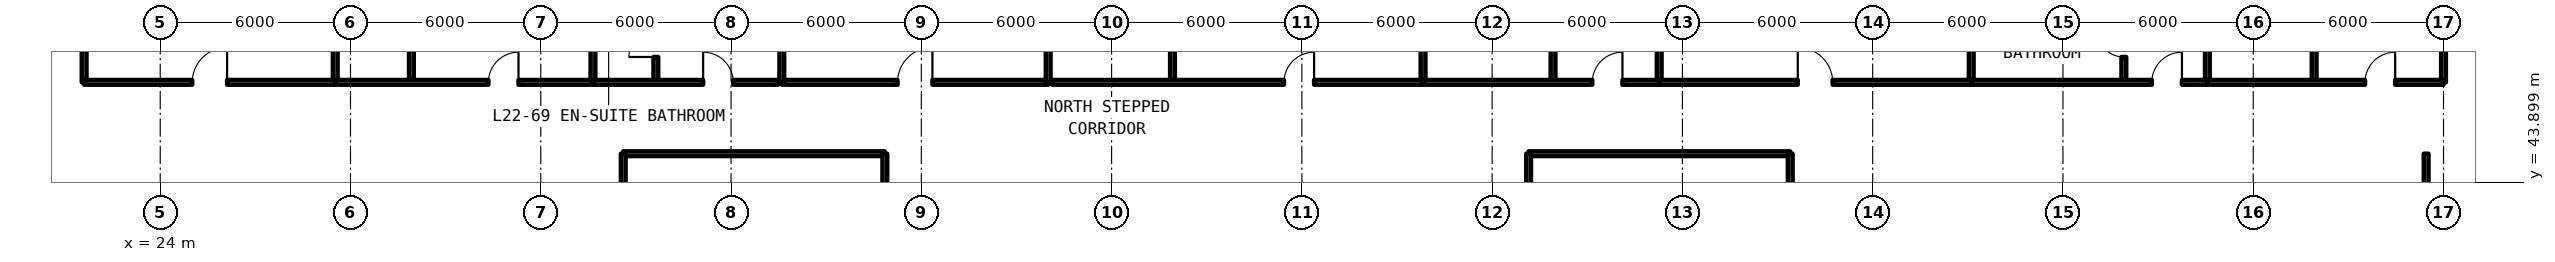
"""IFC4 building model, lengths in metres.
Left out: names, types, materials, properties, quantities, classifications, styles, units other than length and angle.
Written with IfcOpenShell. Run it as: python <this file> out.ifc"""

import sys

from ifc_helpers import new_model, si_unit, direction, frame, frame_2d, origin, place, context, subcontext, project, spatial, rectangle, extrude, element, fill, save


model = new_model("IFC4")
c1 = context("Model", 3, precision=1e-05, world=origin(), true_north=direction((0.0, 1.0)))
c2 = subcontext(c1, "Body", "Model", "MODEL_VIEW")
j1 = project(units=[si_unit("LENGTHUNIT", "METRE"), si_unit("PLANEANGLEUNIT", "RADIAN")], contexts=[c1])
p1 = place(None, origin())
s1 = spatial("IfcSite", under=j1, at=p1, CompositionType="ELEMENT")
p2 = place(p1, origin())
s2 = spatial("IfcBuilding", under=s1, at=p2, CompositionType="ELEMENT")
p3 = place(p2, frame((0.0, 0.0, 82.17)))
s3 = spatial("IfcBuildingStorey", under=s2, at=p3, CompositionType="ELEMENT", Elevation=82.17)
p4 = place(p3, frame((38.6, 44.8, 0.0), z_axis=(0.0, 0.0, 1.0), x_axis=(1.0, 0.0, 0.0)))
e1 = element("IfcWall", 1, at=p4, inside=s3, PredefinedType="SOLIDWALL", context=c2, shape_type="SweptSolid", body=[
    extrude(rectangle(XDim=8.25, YDim=0.15, at=frame_2d((4.125, 0.0))), origin(), (0.0, 0.0, 1.0), 2.35),
])
p5 = place(p3, frame((38.6, 22.4, 0.0), z_axis=(0.0, 0.0, 1.0), x_axis=(0.0, 1.0, 0.0)))
e2 = element("IfcWall", 2, at=p5, inside=s3, PredefinedType="SOLIDWALL", context=c2, shape_type="SweptSolid", body=[
    extrude(rectangle(XDim=22.4, YDim=0.15, at=frame_2d((11.2, 0.0))), origin(), (0.0, 0.0, 1.0), 2.35),
])
p6 = place(p5, frame((8.025, 0.0, 0.0)))
e3 = element("IfcOpeningElement", 3, at=p6, cuts=e2, PredefinedType="OPENING", context=c2, shape_type="SweptSolid", body=[
    extrude(rectangle(XDim=0.95, YDim=2.15, at=frame_2d((0.475, 1.075))), frame((0.0, 0.085, 0.0), z_axis=(0.0, -1.0, 0.0), x_axis=(1.0, 0.0, 0.0)), (0.0, 0.0, 1.0), 0.17),
])
p7 = place(p3, frame((46.85, 22.4, 0.0), z_axis=(0.0, 0.0, 1.0), x_axis=(0.0, 1.0, 0.0)))
e4 = element("IfcWall", 4, at=p7, inside=s3, PredefinedType="SOLIDWALL", context=c2, shape_type="SweptSolid", body=[
    extrude(rectangle(XDim=22.4, YDim=0.15, at=frame_2d((11.2, 0.0))), origin(), (0.0, 0.0, 1.0), 2.35),
])
p8 = place(p3, frame((67.15, 44.8, 0.0), z_axis=(0.0, 0.0, 1.0), x_axis=(1.0, 0.0, 0.0)))
e5 = element("IfcWall", 5, at=p8, inside=s3, PredefinedType="SOLIDWALL", context=c2, shape_type="SweptSolid", body=[
    extrude(rectangle(XDim=8.25, YDim=0.15, at=frame_2d((4.125, 0.0))), origin(), (0.0, 0.0, 1.0), 2.35),
])
p9 = place(p3, frame((67.15, 22.4, 0.0), z_axis=(0.0, 0.0, 1.0), x_axis=(0.0, 1.0, 0.0)))
e6 = element("IfcWall", 6, at=p9, inside=s3, PredefinedType="SOLIDWALL", context=c2, shape_type="SweptSolid", body=[
    extrude(rectangle(XDim=22.4, YDim=0.15, at=frame_2d((11.2, 0.0))), origin(), (0.0, 0.0, 1.0), 2.35),
])
p10 = place(p3, frame((75.4, 22.4, 0.0), z_axis=(0.0, 0.0, 1.0), x_axis=(0.0, 1.0, 0.0)))
e7 = element("IfcWall", 7, at=p10, inside=s3, PredefinedType="SOLIDWALL", context=c2, shape_type="SweptSolid", body=[
    extrude(rectangle(XDim=22.4, YDim=0.15, at=frame_2d((11.2, 0.0))), origin(), (0.0, 0.0, 1.0), 2.35),
])
p11 = place(p10, frame((8.025, 0.0, 0.0)))
e8 = element("IfcOpeningElement", 8, at=p11, cuts=e7, PredefinedType="OPENING", context=c2, shape_type="SweptSolid", body=[
    extrude(rectangle(XDim=0.95, YDim=2.15, at=frame_2d((0.475, 1.075))), frame((0.0, 0.085, 0.0), z_axis=(0.0, -1.0, 0.0), x_axis=(1.0, 0.0, 0.0)), (0.0, 0.0, 1.0), 0.17),
])
p12 = place(p3, frame((95.452, 39.6, 0.0), z_axis=(0.0, 0.0, 1.0), x_axis=(0.0, 1.0, 0.0)))
e9 = element("IfcWall", 9, at=p12, inside=s3, PredefinedType="PARTITIONING", context=c2, shape_type="SweptSolid", body=[
    extrude(rectangle(XDim=5.2, YDim=0.15, at=frame_2d((2.6, 0.0))), origin(), (0.0, 0.0, 1.0), 2.35),
])
p13 = place(p3, frame((43.6, 47.05, 0.0), z_axis=(0.0, 0.0, 1.0), x_axis=(1.0, 0.0, 0.0)))
e10 = element("IfcWall", 10, at=p13, inside=s3, PredefinedType="SOLIDWALL", context=c2, shape_type="SweptSolid", body=[
    extrude(rectangle(XDim=8.4, YDim=0.15, at=frame_2d((4.2, 0.0))), origin(), (0.0, 0.0, 1.0), 2.35),
])
p14 = place(p13, frame((3.65, 0.0, 0.0)))
e11 = element("IfcOpeningElement", 11, at=p14, cuts=e10, PredefinedType="OPENING", context=c2, shape_type="SweptSolid", body=[
    extrude(rectangle(XDim=1.1, YDim=2.15, at=frame_2d((0.55, 1.075))), frame((0.0, 0.085, 0.0), z_axis=(0.0, -1.0, 0.0), x_axis=(1.0, 0.0, 0.0)), (0.0, 0.0, 1.0), 0.17),
])
for number, where, z_axis, x_axis in (
    (12, (43.6, 47.05, 0.0), (0.0, 0.0, 1.0), (0.0, 1.0, 0.0)),
    (13, (52.0, 47.05, 0.0), (0.0, 0.0, 1.0), (0.0, 1.0, 0.0)),
    (14, (21.6, 47.05, 0.0), (0.0, 0.0, 1.0), (0.0, 1.0, 0.0)),
    (15, (29.519, 47.05, 0.0), (0.0, 0.0, 1.0), (0.0, 1.0, 0.0)),
):
    element("IfcWall", number, at=place(p3, frame(where, z_axis=z_axis, x_axis=x_axis)), inside=s3, PredefinedType="SOLIDWALL", context=c2, shape_type="SweptSolid", body=[
        extrude(rectangle(XDim=10.3, YDim=0.15, at=frame_2d((5.15, 0.0))), origin(), (0.0, 0.0, 1.0), 2.35),
    ])
p15 = place(p3, frame((21.6, 47.05, 0.0), z_axis=(0.0, 0.0, 1.0), x_axis=(1.0, 0.0, 0.0)))
e16 = element("IfcWall", 16, at=p15, inside=s3, PredefinedType="SOLIDWALL", context=c2, shape_type="SweptSolid", body=[
    extrude(rectangle(XDim=7.918, YDim=0.15, at=frame_2d((3.959, 0.0))), origin(), (0.0, 0.0, 1.0), 2.35),
])
p16 = place(p15, frame((3.409, 0.0, 0.0)))
e17 = element("IfcOpeningElement", 17, at=p16, cuts=e16, PredefinedType="OPENING", context=c2, shape_type="SweptSolid", body=[
    extrude(rectangle(XDim=1.1, YDim=2.15, at=frame_2d((0.55, 1.075))), frame((0.0, 0.085, 0.0), z_axis=(0.0, -1.0, 0.0), x_axis=(1.0, 0.0, 0.0)), (0.0, 0.0, 1.0), 0.17),
])
p17 = place(p3, frame((37.646, 47.05, 0.0), z_axis=(0.0, 0.0, 1.0), x_axis=(0.0, 1.0, 0.0)))
e18 = element("IfcWall", 18, at=p17, inside=s3, PredefinedType="SOLIDWALL", context=c2, shape_type="SweptSolid", body=[
    extrude(rectangle(XDim=10.3, YDim=0.15, at=frame_2d((5.15, 0.0))), origin(), (0.0, 0.0, 1.0), 2.35),
])
p18 = place(p3, frame((31.92, 47.05, 0.0), z_axis=(0.0, 0.0, 1.0), x_axis=(0.0, 1.0, 0.0)))
e19 = element("IfcWall", 19, at=p18, inside=s3, PredefinedType="PARTITIONING", context=c2, shape_type="SweptSolid", body=[
    extrude(rectangle(XDim=6.67, YDim=0.15, at=frame_2d((3.335, 0.0))), origin(), (0.0, 0.0, 1.0), 2.35),
])
p19 = place(p18, frame((1.543, 0.0, 0.0)))
e20 = element("IfcOpeningElement", 20, at=p19, cuts=e19, PredefinedType="OPENING", context=c2, shape_type="SweptSolid", body=[
    extrude(rectangle(XDim=0.85, YDim=2.1, at=frame_2d((0.425, 1.05))), frame((0.0, 0.085, 0.0), z_axis=(0.0, -1.0, 0.0), x_axis=(1.0, 0.0, 0.0)), (0.0, 0.0, 1.0), 0.17),
])
p20 = place(p18, frame((4.878, 0.0, 0.0)))
e21 = element("IfcOpeningElement", 21, at=p20, cuts=e19, PredefinedType="OPENING", context=c2, shape_type="SweptSolid", body=[
    extrude(rectangle(XDim=0.85, YDim=2.1, at=frame_2d((0.425, 1.05))), frame((0.0, 0.085, 0.0), z_axis=(0.0, -1.0, 0.0), x_axis=(1.0, 0.0, 0.0)), (0.0, 0.0, 1.0), 0.17),
])
p21 = place(p3, frame((29.519, 47.05, 0.0), z_axis=(0.0, 0.0, 1.0), x_axis=(1.0, 0.0, 0.0)))
e22 = element("IfcWall", 22, at=p21, inside=s3, PredefinedType="SOLIDWALL", context=c2, shape_type="SweptSolid", body=[
    extrude(rectangle(XDim=8.127, YDim=0.15, at=frame_2d((4.063, 0.0))), origin(), (0.0, 0.0, 1.0), 2.35),
])
p22 = place(p21, frame((4.829, 0.0, 0.0)))
e23 = element("IfcOpeningElement", 23, at=p22, cuts=e22, PredefinedType="OPENING", context=c2, shape_type="SweptSolid", body=[
    extrude(rectangle(XDim=0.95, YDim=2.15, at=frame_2d((0.475, 1.075))), frame((0.0, 0.085, 0.0), z_axis=(0.0, -1.0, 0.0), x_axis=(1.0, 0.0, 0.0)), (0.0, 0.0, 1.0), 0.17),
])
p23 = place(p3, frame((39.629, 47.05, 0.0), z_axis=(0.0, 0.0, 1.0), x_axis=(0.0, 1.0, 0.0)))
e24 = element("IfcWall", 24, at=p23, inside=s3, PredefinedType="PARTITIONING", context=c2, shape_type="SweptSolid", body=[
    extrude(rectangle(XDim=10.3, YDim=0.15, at=frame_2d((5.15, 0.0))), origin(), (0.0, 0.0, 1.0), 2.35),
])
p24 = place(p23, frame((0.8, 0.0, 0.0)))
e25 = element("IfcOpeningElement", 25, at=p24, cuts=e24, PredefinedType="OPENING", context=c2, shape_type="SweptSolid", body=[
    extrude(rectangle(XDim=0.85, YDim=2.1, at=frame_2d((0.425, 1.05))), frame((0.0, 0.085, 0.0), z_axis=(0.0, -1.0, 0.0), x_axis=(1.0, 0.0, 0.0)), (0.0, 0.0, 1.0), 0.17),
])
p25 = place(p23, frame((5.25, 0.0, 0.0)))
e26 = element("IfcOpeningElement", 26, at=p25, cuts=e24, PredefinedType="OPENING", context=c2, shape_type="SweptSolid", body=[
    extrude(rectangle(XDim=0.85, YDim=2.1, at=frame_2d((0.425, 1.05))), frame((0.0, 0.085, 0.0), z_axis=(0.0, -1.0, 0.0), x_axis=(1.0, 0.0, 0.0)), (0.0, 0.0, 1.0), 0.17),
])
p26 = place(p3, frame((37.646, 47.05, 0.0), z_axis=(0.0, 0.0, 1.0), x_axis=(1.0, 0.0, 0.0)))
e27 = element("IfcWall", 27, at=p26, inside=s3, PredefinedType="SOLIDWALL", context=c2, shape_type="SweptSolid", body=[
    extrude(rectangle(XDim=5.834, YDim=0.15, at=frame_2d((2.917, 0.0))), origin(), (0.0, 0.0, 1.0), 2.35),
])
p27 = place(p26, frame((3.474, 0.0, 0.0)))
e28 = element("IfcOpeningElement", 28, at=p27, cuts=e27, PredefinedType="OPENING", context=c2, shape_type="SweptSolid", body=[
    extrude(rectangle(XDim=0.95, YDim=2.15, at=frame_2d((0.475, 1.075))), frame((0.0, 0.085, 0.0), z_axis=(0.0, -1.0, 0.0), x_axis=(1.0, 0.0, 0.0)), (0.0, 0.0, 1.0), 0.17),
])
for number, where, z_axis, x_axis in (
    (29, (96.0, 47.05, 0.0), (0.0, 0.0, 1.0), (0.0, 1.0, 0.0)),
    (30, (63.821, 47.05, 0.0), (0.0, 0.0, 1.0), (0.0, 1.0, 0.0)),
):
    element("IfcWall", number, at=place(p3, frame(where, z_axis=z_axis, x_axis=x_axis)), inside=s3, PredefinedType="SOLIDWALL", context=c2, shape_type="SweptSolid", body=[
        extrude(rectangle(XDim=10.3, YDim=0.15, at=frame_2d((5.15, 0.0))), origin(), (0.0, 0.0, 1.0), 2.35),
    ])
p28 = place(p3, frame((55.92, 47.05, 0.0), z_axis=(0.0, 0.0, 1.0), x_axis=(0.0, 1.0, 0.0)))
e31 = element("IfcWall", 31, at=p28, inside=s3, PredefinedType="PARTITIONING", context=c2, shape_type="SweptSolid", body=[
    extrude(rectangle(XDim=5.452, YDim=0.15, at=frame_2d((2.726, 0.0))), origin(), (0.0, 0.0, 1.0), 2.35),
])
p29 = place(p28, frame((1.183, 0.0, 0.0)))
e32 = element("IfcOpeningElement", 32, at=p29, cuts=e31, PredefinedType="OPENING", context=c2, shape_type="SweptSolid", body=[
    extrude(rectangle(XDim=0.85, YDim=2.1, at=frame_2d((0.425, 1.05))), frame((0.0, 0.085, 0.0), z_axis=(0.0, -1.0, 0.0), x_axis=(1.0, 0.0, 0.0)), (0.0, 0.0, 1.0), 0.17),
])
p30 = place(p28, frame((3.909, 0.0, 0.0)))
e33 = element("IfcOpeningElement", 33, at=p30, cuts=e31, PredefinedType="OPENING", context=c2, shape_type="SweptSolid", body=[
    extrude(rectangle(XDim=0.85, YDim=2.1, at=frame_2d((0.425, 1.05))), frame((0.0, 0.085, 0.0), z_axis=(0.0, -1.0, 0.0), x_axis=(1.0, 0.0, 0.0)), (0.0, 0.0, 1.0), 0.17),
])
p31 = place(p3, frame((52.12, 47.05, 0.0), z_axis=(0.0, 0.0, 1.0), x_axis=(1.0, 0.0, 0.0)))
e34 = element("IfcWall", 34, at=p31, inside=s3, PredefinedType="SOLIDWALL", context=c2, shape_type="SweptSolid", body=[
    extrude(rectangle(XDim=11.701, YDim=0.15, at=frame_2d((5.851, 0.0))), origin(), (0.0, 0.0, 1.0), 2.35),
])
p32 = place(p31, frame((7.316, 0.0, 0.0)))
e35 = element("IfcOpeningElement", 35, at=p32, cuts=e34, PredefinedType="OPENING", context=c2, shape_type="SweptSolid", body=[
    extrude(rectangle(XDim=0.95, YDim=2.15, at=frame_2d((0.475, 1.075))), frame((0.0, 0.085, 0.0), z_axis=(0.0, -1.0, 0.0), x_axis=(1.0, 0.0, 0.0)), (0.0, 0.0, 1.0), 0.17),
])
p33 = place(p3, frame((71.268, 47.05, 0.0), z_axis=(0.0, 0.0, 1.0), x_axis=(0.0, 1.0, 0.0)))
e36 = element("IfcWall", 36, at=p33, inside=s3, PredefinedType="SOLIDWALL", context=c2, shape_type="SweptSolid", body=[
    extrude(rectangle(XDim=10.3, YDim=0.15, at=frame_2d((5.15, 0.0))), origin(), (0.0, 0.0, 1.0), 2.35),
])
p34 = place(p3, frame((67.92, 47.05, 0.0), z_axis=(0.0, 0.0, 1.0), x_axis=(0.0, 1.0, 0.0)))
e37 = element("IfcWall", 37, at=p34, inside=s3, PredefinedType="PARTITIONING", context=c2, shape_type="SweptSolid", body=[
    extrude(rectangle(XDim=6.338, YDim=0.15, at=frame_2d((3.169, 0.0))), origin(), (0.0, 0.0, 1.0), 2.35),
])
p35 = place(p34, frame((1.445, 0.0, 0.0)))
e38 = element("IfcOpeningElement", 38, at=p35, cuts=e37, PredefinedType="OPENING", context=c2, shape_type="SweptSolid", body=[
    extrude(rectangle(XDim=0.85, YDim=2.1, at=frame_2d((0.425, 1.05))), frame((0.0, 0.085, 0.0), z_axis=(0.0, -1.0, 0.0), x_axis=(1.0, 0.0, 0.0)), (0.0, 0.0, 1.0), 0.17),
])
p36 = place(p34, frame((4.614, 0.0, 0.0)))
e39 = element("IfcOpeningElement", 39, at=p36, cuts=e37, PredefinedType="OPENING", context=c2, shape_type="SweptSolid", body=[
    extrude(rectangle(XDim=0.85, YDim=2.1, at=frame_2d((0.425, 1.05))), frame((0.0, 0.085, 0.0), z_axis=(0.0, -1.0, 0.0), x_axis=(1.0, 0.0, 0.0)), (0.0, 0.0, 1.0), 0.17),
])
p37 = place(p3, frame((63.821, 47.05, 0.0), z_axis=(0.0, 0.0, 1.0), x_axis=(1.0, 0.0, 0.0)))
e40 = element("IfcWall", 40, at=p37, inside=s3, PredefinedType="SOLIDWALL", context=c2, shape_type="SweptSolid", body=[
    extrude(rectangle(XDim=7.446, YDim=0.15, at=frame_2d((3.723, 0.0))), origin(), (0.0, 0.0, 1.0), 2.35),
])
p38 = place(p37, frame((5.337, 0.0, 0.0)))
e41 = element("IfcOpeningElement", 41, at=p38, cuts=e40, PredefinedType="OPENING", context=c2, shape_type="SweptSolid", body=[
    extrude(rectangle(XDim=0.95, YDim=2.15, at=frame_2d((0.475, 1.075))), frame((0.0, 0.085, 0.0), z_axis=(0.0, -1.0, 0.0), x_axis=(1.0, 0.0, 0.0)), (0.0, 0.0, 1.0), 0.17),
])
p39 = place(p3, frame((81.107, 47.05, 0.0), z_axis=(0.0, 0.0, 1.0), x_axis=(0.0, 1.0, 0.0)))
e42 = element("IfcWall", 42, at=p39, inside=s3, PredefinedType="SOLIDWALL", context=c2, shape_type="SweptSolid", body=[
    extrude(rectangle(XDim=10.3, YDim=0.15, at=frame_2d((5.15, 0.0))), origin(), (0.0, 0.0, 1.0), 2.35),
])
p40 = place(p3, frame((71.268, 47.05, 0.0), z_axis=(0.0, 0.0, 1.0), x_axis=(1.0, 0.0, 0.0)))
e43 = element("IfcWall", 43, at=p40, inside=s3, PredefinedType="SOLIDWALL", context=c2, shape_type="SweptSolid", body=[
    extrude(rectangle(XDim=9.84, YDim=0.15, at=frame_2d((4.92, 0.0))), origin(), (0.0, 0.0, 1.0), 2.35),
])
p41 = place(p40, frame((4.37, 0.0, 0.0)))
e44 = element("IfcOpeningElement", 44, at=p41, cuts=e43, PredefinedType="OPENING", context=c2, shape_type="SweptSolid", body=[
    extrude(rectangle(XDim=1.1, YDim=2.15, at=frame_2d((0.55, 1.075))), frame((0.0, 0.085, 0.0), z_axis=(0.0, -1.0, 0.0), x_axis=(1.0, 0.0, 0.0)), (0.0, 0.0, 1.0), 0.17),
])
p42 = place(p3, frame((88.554, 47.05, 0.0), z_axis=(0.0, 0.0, 1.0), x_axis=(0.0, 1.0, 0.0)))
e45 = element("IfcWall", 45, at=p42, inside=s3, PredefinedType="SOLIDWALL", context=c2, shape_type="SweptSolid", body=[
    extrude(rectangle(XDim=10.3, YDim=0.15, at=frame_2d((5.15, 0.0))), origin(), (0.0, 0.0, 1.0), 2.35),
])
p43 = place(p3, frame((85.92, 47.05, 0.0), z_axis=(0.0, 0.0, 1.0), x_axis=(0.0, 1.0, 0.0)))
e46 = element("IfcWall", 46, at=p43, inside=s3, PredefinedType="PARTITIONING", context=c2, shape_type="SweptSolid", body=[
    extrude(rectangle(XDim=10.3, YDim=0.15, at=frame_2d((5.15, 0.0))), origin(), (0.0, 0.0, 1.0), 2.35),
])
p44 = place(p43, frame((0.8, 0.0, 0.0)))
e47 = element("IfcOpeningElement", 47, at=p44, cuts=e46, PredefinedType="OPENING", context=c2, shape_type="SweptSolid", body=[
    extrude(rectangle(XDim=0.85, YDim=2.1, at=frame_2d((0.425, 1.05))), frame((0.0, 0.085, 0.0), z_axis=(0.0, -1.0, 0.0), x_axis=(1.0, 0.0, 0.0)), (0.0, 0.0, 1.0), 0.17),
])
p45 = place(p43, frame((5.25, 0.0, 0.0)))
e48 = element("IfcOpeningElement", 48, at=p45, cuts=e46, PredefinedType="OPENING", context=c2, shape_type="SweptSolid", body=[
    extrude(rectangle(XDim=0.85, YDim=2.1, at=frame_2d((0.425, 1.05))), frame((0.0, 0.085, 0.0), z_axis=(0.0, -1.0, 0.0), x_axis=(1.0, 0.0, 0.0)), (0.0, 0.0, 1.0), 0.17),
])
p46 = place(p3, frame((81.107, 47.05, 0.0), z_axis=(0.0, 0.0, 1.0), x_axis=(1.0, 0.0, 0.0)))
e49 = element("IfcWall", 49, at=p46, inside=s3, PredefinedType="SOLIDWALL", context=c2, shape_type="SweptSolid", body=[
    extrude(rectangle(XDim=7.446, YDim=0.15, at=frame_2d((3.723, 0.0))), origin(), (0.0, 0.0, 1.0), 2.35),
])
p47 = place(p46, frame((5.694, 0.0, 0.0)))
e50 = element("IfcOpeningElement", 50, at=p47, cuts=e49, PredefinedType="OPENING", context=c2, shape_type="SweptSolid", body=[
    extrude(rectangle(XDim=0.95, YDim=2.15, at=frame_2d((0.475, 1.075))), frame((0.0, 0.085, 0.0), z_axis=(0.0, -1.0, 0.0), x_axis=(1.0, 0.0, 0.0)), (0.0, 0.0, 1.0), 0.17),
])
p48 = place(p3, frame((91.92, 47.05, 0.0), z_axis=(0.0, 0.0, 1.0), x_axis=(0.0, 1.0, 0.0)))
e51 = element("IfcWall", 51, at=p48, inside=s3, PredefinedType="PARTITIONING", context=c2, shape_type="SweptSolid", body=[
    extrude(rectangle(XDim=6.338, YDim=0.15, at=frame_2d((3.169, 0.0))), origin(), (0.0, 0.0, 1.0), 2.35),
])
p49 = place(p48, frame((1.445, 0.0, 0.0)))
e52 = element("IfcOpeningElement", 52, at=p49, cuts=e51, PredefinedType="OPENING", context=c2, shape_type="SweptSolid", body=[
    extrude(rectangle(XDim=0.85, YDim=2.1, at=frame_2d((0.425, 1.05))), frame((0.0, 0.085, 0.0), z_axis=(0.0, -1.0, 0.0), x_axis=(1.0, 0.0, 0.0)), (0.0, 0.0, 1.0), 0.17),
])
p50 = place(p48, frame((4.614, 0.0, 0.0)))
e53 = element("IfcOpeningElement", 53, at=p50, cuts=e51, PredefinedType="OPENING", context=c2, shape_type="SweptSolid", body=[
    extrude(rectangle(XDim=0.85, YDim=2.1, at=frame_2d((0.425, 1.05))), frame((0.0, 0.085, 0.0), z_axis=(0.0, -1.0, 0.0), x_axis=(1.0, 0.0, 0.0)), (0.0, 0.0, 1.0), 0.17),
])
p51 = place(p3, frame((88.554, 47.05, 0.0), z_axis=(0.0, 0.0, 1.0), x_axis=(1.0, 0.0, 0.0)))
e54 = element("IfcWall", 54, at=p51, inside=s3, PredefinedType="SOLIDWALL", context=c2, shape_type="SweptSolid", body=[
    extrude(rectangle(XDim=7.446, YDim=0.15, at=frame_2d((3.723, 0.0))), origin(), (0.0, 0.0, 1.0), 2.35),
])
p52 = place(p51, frame((4.971, 0.0, 0.0)))
e55 = element("IfcOpeningElement", 55, at=p52, cuts=e54, PredefinedType="OPENING", context=c2, shape_type="SweptSolid", body=[
    extrude(rectangle(XDim=0.95, YDim=2.15, at=frame_2d((0.475, 1.075))), frame((0.0, 0.085, 0.0), z_axis=(0.0, -1.0, 0.0), x_axis=(1.0, 0.0, 0.0)), (0.0, 0.0, 1.0), 0.17),
])
p53 = place(p14, origin())
e56 = element("IfcDoor", 56, at=p53, inside=s3, OperationType="SINGLE_SWING_RIGHT", PredefinedType="DOOR", context=c2, shape_type="SweptSolid", body=[
    extrude(rectangle(XDim=1.1, YDim=2.15, at=frame_2d((0.55, 1.075))), frame((0.0, 0.025, 0.0), z_axis=(0.0, -1.0, 0.0), x_axis=(1.0, 0.0, 0.0)), (0.0, 0.0, 1.0), 0.05),
])
fill(e11, e56)
p54 = place(p16, origin())
e57 = element("IfcDoor", 57, at=p54, inside=s3, OperationType="SINGLE_SWING_RIGHT", PredefinedType="DOOR", context=c2, shape_type="SweptSolid", body=[
    extrude(rectangle(XDim=1.1, YDim=2.15, at=frame_2d((0.55, 1.075))), frame((0.0, 0.025, 0.0), z_axis=(0.0, -1.0, 0.0), x_axis=(1.0, 0.0, 0.0)), (0.0, 0.0, 1.0), 0.05),
])
fill(e17, e57)
p55 = place(p22, origin())
e58 = element("IfcDoor", 58, at=p55, inside=s3, OperationType="SINGLE_SWING_RIGHT", PredefinedType="DOOR", context=c2, shape_type="SweptSolid", body=[
    extrude(rectangle(XDim=0.95, YDim=2.15, at=frame_2d((0.475, 1.075))), frame((0.0, 0.025, 0.0), z_axis=(0.0, -1.0, 0.0), x_axis=(1.0, 0.0, 0.0)), (0.0, 0.0, 1.0), 0.05),
])
fill(e23, e58)
p56 = place(p24, origin())
e59 = element("IfcDoor", 59, at=p56, inside=s3, OperationType="SINGLE_SWING_LEFT", PredefinedType="DOOR", context=c2, shape_type="SweptSolid", body=[
    extrude(rectangle(XDim=0.85, YDim=2.1, at=frame_2d((0.425, 1.05))), frame((0.0, 0.025, 0.0), z_axis=(0.0, -1.0, 0.0), x_axis=(1.0, 0.0, 0.0)), (0.0, 0.0, 1.0), 0.05),
])
fill(e25, e59)
p57 = place(p27, origin())
e60 = element("IfcDoor", 60, at=p57, inside=s3, OperationType="SINGLE_SWING_LEFT", PredefinedType="DOOR", context=c2, shape_type="SweptSolid", body=[
    extrude(rectangle(XDim=0.95, YDim=2.15, at=frame_2d((0.475, 1.075))), frame((0.0, 0.025, 0.0), z_axis=(0.0, -1.0, 0.0), x_axis=(1.0, 0.0, 0.0)), (0.0, 0.0, 1.0), 0.05),
])
fill(e28, e60)
p58 = place(p32, origin())
e61 = element("IfcDoor", 61, at=p58, inside=s3, OperationType="SINGLE_SWING_RIGHT", PredefinedType="DOOR", context=c2, shape_type="SweptSolid", body=[
    extrude(rectangle(XDim=0.95, YDim=2.15, at=frame_2d((0.475, 1.075))), frame((0.0, 0.025, 0.0), z_axis=(0.0, -1.0, 0.0), x_axis=(1.0, 0.0, 0.0)), (0.0, 0.0, 1.0), 0.05),
])
fill(e35, e61)
p59 = place(p38, origin())
e62 = element("IfcDoor", 62, at=p59, inside=s3, OperationType="SINGLE_SWING_RIGHT", PredefinedType="DOOR", context=c2, shape_type="SweptSolid", body=[
    extrude(rectangle(XDim=0.95, YDim=2.15, at=frame_2d((0.475, 1.075))), frame((0.0, 0.025, 0.0), z_axis=(0.0, -1.0, 0.0), x_axis=(1.0, 0.0, 0.0)), (0.0, 0.0, 1.0), 0.05),
])
fill(e41, e62)
p60 = place(p41, origin())
e63 = element("IfcDoor", 63, at=p60, inside=s3, OperationType="SINGLE_SWING_LEFT", PredefinedType="DOOR", context=c2, shape_type="SweptSolid", body=[
    extrude(rectangle(XDim=1.1, YDim=2.15, at=frame_2d((0.55, 1.075))), frame((0.0, 0.025, 0.0), z_axis=(0.0, -1.0, 0.0), x_axis=(1.0, 0.0, 0.0)), (0.0, 0.0, 1.0), 0.05),
])
fill(e44, e63)
p61 = place(p44, origin())
e64 = element("IfcDoor", 64, at=p61, inside=s3, OperationType="SINGLE_SWING_RIGHT", PredefinedType="DOOR", context=c2, shape_type="SweptSolid", body=[
    extrude(rectangle(XDim=0.85, YDim=2.1, at=frame_2d((0.425, 1.05))), frame((0.0, 0.025, 0.0), z_axis=(0.0, -1.0, 0.0), x_axis=(1.0, 0.0, 0.0)), (0.0, 0.0, 1.0), 0.05),
])
fill(e47, e64)
p62 = place(p47, origin())
e65 = element("IfcDoor", 65, at=p62, inside=s3, OperationType="SINGLE_SWING_RIGHT", PredefinedType="DOOR", context=c2, shape_type="SweptSolid", body=[
    extrude(rectangle(XDim=0.95, YDim=2.15, at=frame_2d((0.475, 1.075))), frame((0.0, 0.025, 0.0), z_axis=(0.0, -1.0, 0.0), x_axis=(1.0, 0.0, 0.0)), (0.0, 0.0, 1.0), 0.05),
])
fill(e50, e65)
p63 = place(p52, origin())
e66 = element("IfcDoor", 66, at=p63, inside=s3, OperationType="SINGLE_SWING_RIGHT", PredefinedType="DOOR", context=c2, shape_type="SweptSolid", body=[
    extrude(rectangle(XDim=0.95, YDim=2.15, at=frame_2d((0.475, 1.075))), frame((0.0, 0.025, 0.0), z_axis=(0.0, -1.0, 0.0), x_axis=(1.0, 0.0, 0.0)), (0.0, 0.0, 1.0), 0.05),
])
fill(e55, e66)
save(model, sys.argv[1])
